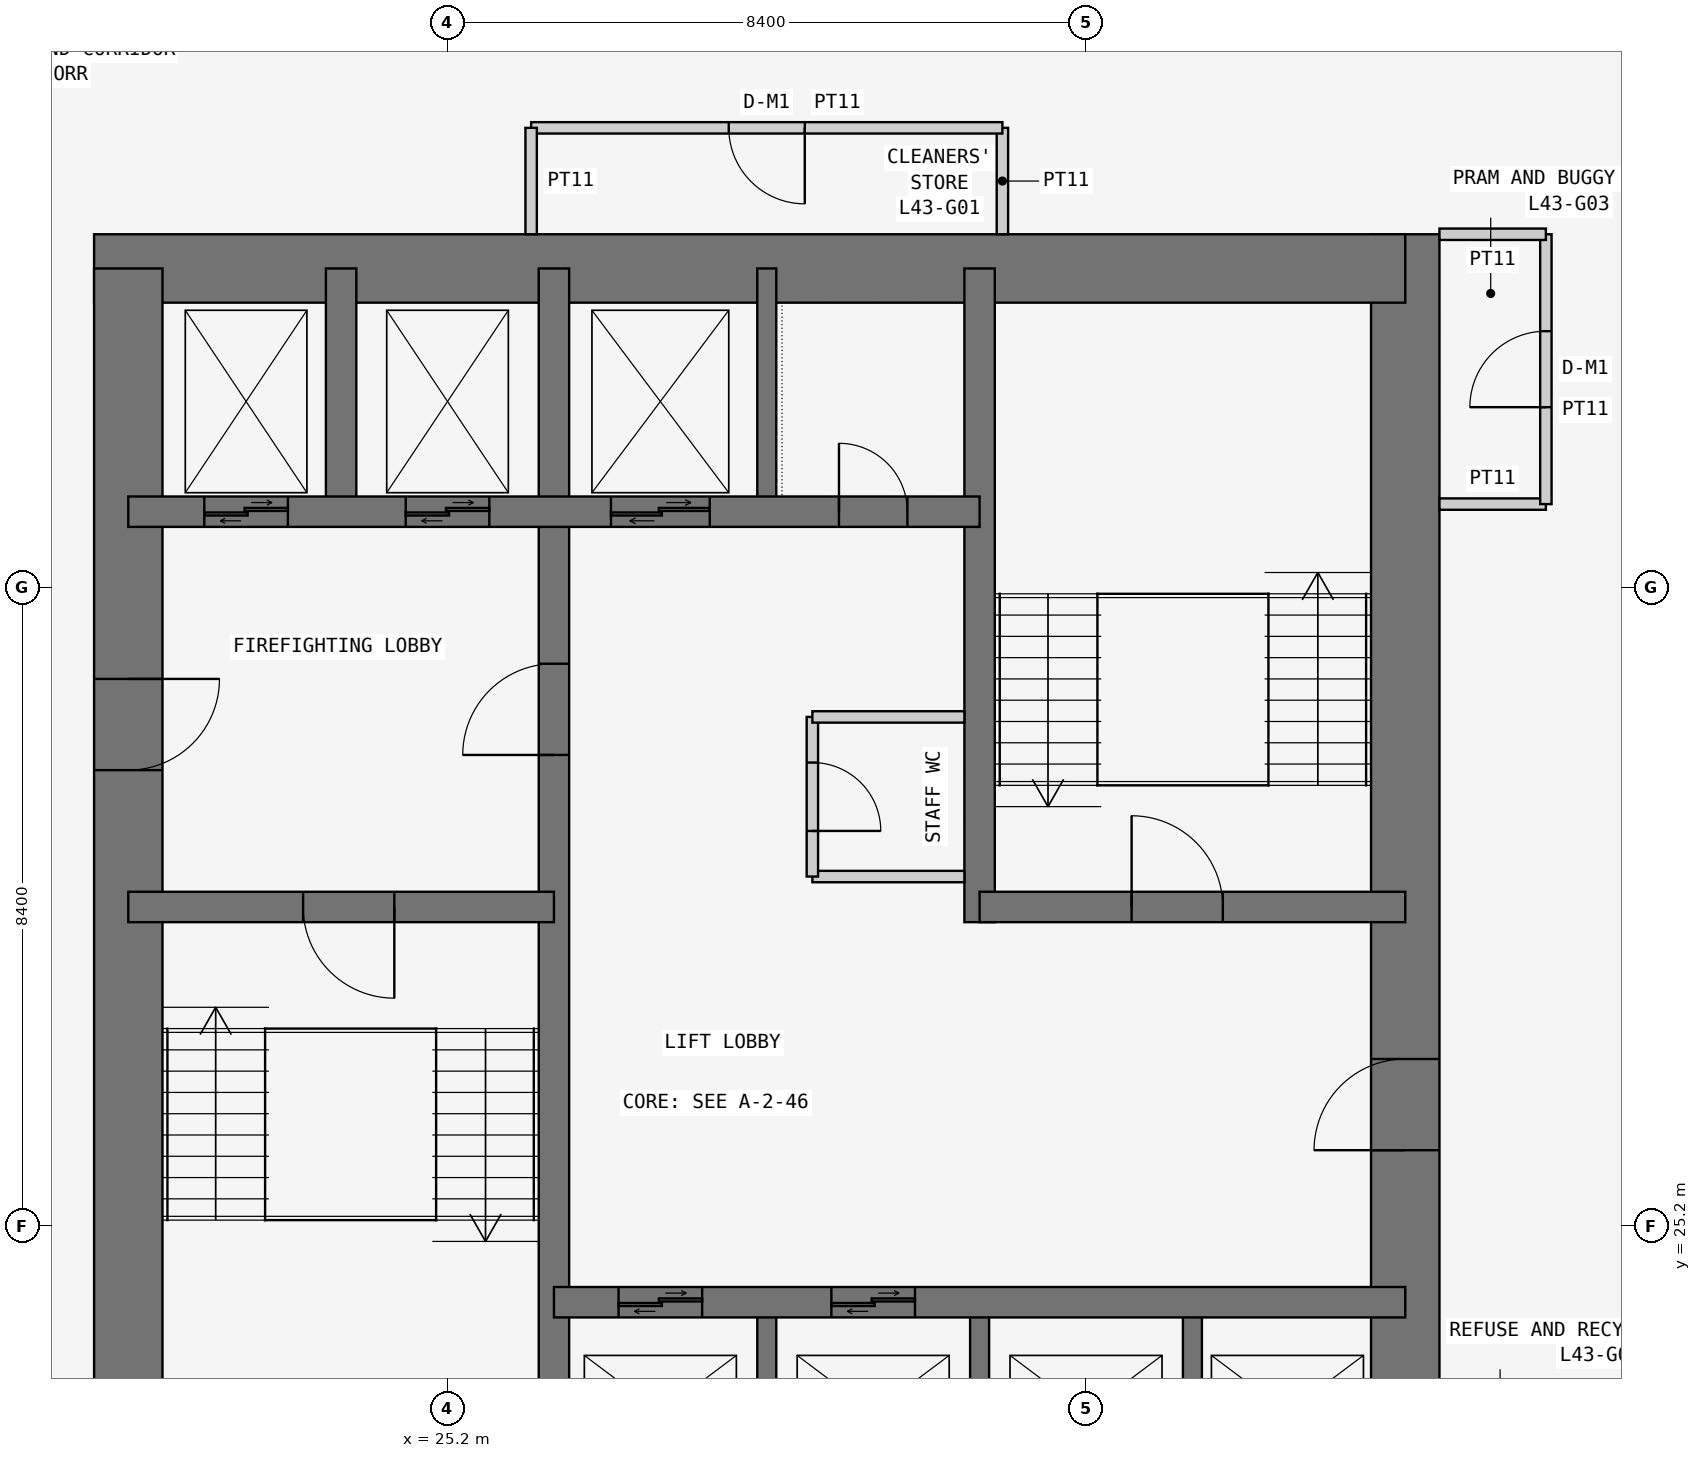
"""IFC4 building model, lengths in metres.
Left out: names, types, materials, properties, quantities, classifications, styles, units other than length and angle.
Written with IfcOpenShell. Run it as: python <this file> out.ifc"""

import sys

from ifc_helpers import new_model, si_unit, direction, frame, frame_2d, origin, place, context, subcontext, project, spatial, rectangle, extrude, element, fill, save


model = new_model("IFC4")
c1 = context("Model", 3, precision=1e-05, world=origin(), true_north=direction((0.0, 1.0)))
c2 = subcontext(c1, "Body", "Model", "MODEL_VIEW")
j1 = project(units=[si_unit("LENGTHUNIT", "METRE"), si_unit("PLANEANGLEUNIT", "RADIAN")], contexts=[c1])
p1 = place(None, origin())
s1 = spatial("IfcSite", under=j1, at=p1, CompositionType="ELEMENT")
p2 = place(p1, origin())
s2 = spatial("IfcBuilding", under=s1, at=p2, CompositionType="ELEMENT")
p3 = place(p2, frame((0.0, 0.0, 166.5)))
s3 = spatial("IfcBuildingStorey", under=s2, at=p3, CompositionType="ELEMENT", Elevation=166.5)
p4 = place(p3, frame((37.8, 21.0, 0.0), z_axis=(0.0, 0.0, 1.0), x_axis=(0.0, 1.0, 0.0)))
e1 = element("IfcWall", 1, at=p4, inside=s3, PredefinedType="SHEAR", context=c2, shape_type="SweptSolid", body=[
    extrude(rectangle(XDim=17.25, YDim=0.9, at=frame_2d((8.625, 0.0))), origin(), (0.0, 0.0, 1.0), 3.6),
])
p5 = place(p4, frame((5.2, 0.0, 0.0)))
e2 = element("IfcOpeningElement", 2, at=p5, cuts=e1, PredefinedType="OPENING", context=c2, shape_type="SweptSolid", body=[
    extrude(rectangle(XDim=1.2, YDim=2.1, at=frame_2d((0.6, 1.05))), frame((0.0, 0.46, 0.0), z_axis=(0.0, -1.0, 0.0), x_axis=(1.0, 0.0, 0.0)), (0.0, 0.0, 1.0), 0.92),
])
p6 = place(p3, frame((37.8, 37.8, 0.0), z_axis=(0.0, 0.0, 1.0), x_axis=(-1.0, 0.0, 0.0)))
e3 = element("IfcWall", 3, at=p6, inside=s3, PredefinedType="SHEAR", context=c2, shape_type="SweptSolid", body=[
    extrude(rectangle(XDim=17.25, YDim=0.9, at=frame_2d((8.625, 0.0))), origin(), (0.0, 0.0, 1.0), 3.6),
])
p7 = place(p3, frame((21.0, 37.8, 0.0), z_axis=(0.0, 0.0, 1.0), x_axis=(0.0, -1.0, 0.0)))
e4 = element("IfcWall", 4, at=p7, inside=s3, PredefinedType="SHEAR", context=c2, shape_type="SweptSolid", body=[
    extrude(rectangle(XDim=17.25, YDim=0.9, at=frame_2d((8.625, 0.0))), origin(), (0.0, 0.0, 1.0), 3.6),
])
p8 = place(p7, frame((5.4, 0.0, 0.0)))
e5 = element("IfcOpeningElement", 5, at=p8, cuts=e4, PredefinedType="OPENING", context=c2, shape_type="SweptSolid", body=[
    extrude(rectangle(XDim=1.2, YDim=2.1, at=frame_2d((0.6, 1.05))), frame((0.0, 0.46, 0.0), z_axis=(0.0, -1.0, 0.0), x_axis=(1.0, 0.0, 0.0)), (0.0, 0.0, 1.0), 0.92),
])
p9 = place(p3, frame((26.6, 21.0, 0.0), z_axis=(0.0, 0.0, 1.0), x_axis=(0.0, 1.0, 0.0)))
e6 = element("IfcWall", 6, at=p9, inside=s3, PredefinedType="SHEAR", context=c2, shape_type="SweptSolid", body=[
    extrude(rectangle(XDim=16.8, YDim=0.4, at=frame_2d((8.4, 0.0))), origin(), (0.0, 0.0, 1.0), 3.6),
])
p10 = place(p9, frame((10.4, 0.0, 0.0)))
e7 = element("IfcOpeningElement", 7, at=p10, cuts=e6, PredefinedType="OPENING", context=c2, shape_type="SweptSolid", body=[
    extrude(rectangle(XDim=1.2, YDim=2.1, at=frame_2d((0.6, 1.05))), frame((0.0, 0.21, 0.0), z_axis=(0.0, -1.0, 0.0), x_axis=(1.0, 0.0, 0.0)), (0.0, 0.0, 1.0), 0.42),
])
p11 = place(p3, frame((21.0, 29.4, 0.0), z_axis=(0.0, 0.0, 1.0), x_axis=(1.0, 0.0, 0.0)))
e8 = element("IfcWall", 8, at=p11, inside=s3, PredefinedType="SHEAR", context=c2, shape_type="SweptSolid", body=[
    extrude(rectangle(XDim=5.6, YDim=0.4, at=frame_2d((2.8, 0.0))), origin(), (0.0, 0.0, 1.0), 3.6),
])
p12 = place(p11, frame((2.3, 0.0, 0.0)))
e9 = element("IfcOpeningElement", 9, at=p12, cuts=e8, PredefinedType="OPENING", context=c2, shape_type="SweptSolid", body=[
    extrude(rectangle(XDim=1.2, YDim=2.1, at=frame_2d((0.6, 1.05))), frame((0.0, 0.21, 0.0), z_axis=(0.0, -1.0, 0.0), x_axis=(1.0, 0.0, 0.0)), (0.0, 0.0, 1.0), 0.42),
])
p13 = place(p3, frame((21.0, 34.6, 0.0), z_axis=(0.0, 0.0, 1.0), x_axis=(1.0, 0.0, 0.0)))
e10 = element("IfcWall", 10, at=p13, inside=s3, PredefinedType="SHEAR", context=c2, shape_type="SweptSolid", body=[
    extrude(rectangle(XDim=11.2, YDim=0.4, at=frame_2d((5.6, 0.0))), origin(), (0.0, 0.0, 1.0), 3.6),
])
p14 = place(p13, frame((9.35, 0.0, 0.0)))
e11 = element("IfcOpeningElement", 11, at=p14, cuts=e10, PredefinedType="OPENING", context=c2, shape_type="SweptSolid", body=[
    extrude(rectangle(XDim=0.9, YDim=2.1, at=frame_2d((0.45, 1.05))), frame((0.0, 0.21, 0.0), z_axis=(0.0, -1.0, 0.0), x_axis=(1.0, 0.0, 0.0)), (0.0, 0.0, 1.0), 0.42),
])
p15 = place(p13, frame((1.0, 0.0, 0.0)))
e12 = element("IfcOpeningElement", 12, at=p15, cuts=e10, PredefinedType="OPENING", context=c2, shape_type="SweptSolid", body=[
    extrude(rectangle(XDim=1.1, YDim=2.1, at=frame_2d((0.55, 1.05))), frame((0.0, 0.21, 0.0), z_axis=(0.0, -1.0, 0.0), x_axis=(1.0, 0.0, 0.0)), (0.0, 0.0, 1.0), 0.42),
])
p16 = place(p13, frame((3.65, 0.0, 0.0)))
e13 = element("IfcOpeningElement", 13, at=p16, cuts=e10, PredefinedType="OPENING", context=c2, shape_type="SweptSolid", body=[
    extrude(rectangle(XDim=1.1, YDim=2.1, at=frame_2d((0.55, 1.05))), frame((0.0, 0.21, 0.0), z_axis=(0.0, -1.0, 0.0), x_axis=(1.0, 0.0, 0.0)), (0.0, 0.0, 1.0), 0.42),
])
p17 = place(p13, frame((6.35, 0.0, 0.0)))
e14 = element("IfcOpeningElement", 14, at=p17, cuts=e10, PredefinedType="OPENING", context=c2, shape_type="SweptSolid", body=[
    extrude(rectangle(XDim=1.3, YDim=2.1, at=frame_2d((0.65, 1.05))), frame((0.0, 0.21, 0.0), z_axis=(0.0, -1.0, 0.0), x_axis=(1.0, 0.0, 0.0)), (0.0, 0.0, 1.0), 0.42),
])
p18 = place(p3, frame((23.8, 34.6, 0.0), z_axis=(0.0, 0.0, 1.0), x_axis=(0.0, 1.0, 0.0)))
e15 = element("IfcWall", 15, at=p18, inside=s3, PredefinedType="SHEAR", context=c2, shape_type="SweptSolid", body=[
    extrude(rectangle(XDim=3.2, YDim=0.4, at=frame_2d((1.6, 0.0))), origin(), (0.0, 0.0, 1.0), 3.6),
])
p19 = place(p3, frame((26.6, 24.2, 0.0), z_axis=(0.0, 0.0, 1.0), x_axis=(1.0, 0.0, 0.0)))
e16 = element("IfcWall", 16, at=p19, inside=s3, PredefinedType="SHEAR", context=c2, shape_type="SweptSolid", body=[
    extrude(rectangle(XDim=11.2, YDim=0.4, at=frame_2d((5.6, 0.0))), origin(), (0.0, 0.0, 1.0), 3.6),
])
p20 = place(p19, frame((0.85, 0.0, 0.0)))
e17 = element("IfcOpeningElement", 17, at=p20, cuts=e16, PredefinedType="OPENING", context=c2, shape_type="SweptSolid", body=[
    extrude(rectangle(XDim=1.1, YDim=2.1, at=frame_2d((0.55, 1.05))), frame((0.0, 0.21, 0.0), z_axis=(0.0, -1.0, 0.0), x_axis=(1.0, 0.0, 0.0)), (0.0, 0.0, 1.0), 0.42),
])
p21 = place(p19, frame((3.65, 0.0, 0.0)))
e18 = element("IfcOpeningElement", 18, at=p21, cuts=e16, PredefinedType="OPENING", context=c2, shape_type="SweptSolid", body=[
    extrude(rectangle(XDim=1.1, YDim=2.1, at=frame_2d((0.55, 1.05))), frame((0.0, 0.21, 0.0), z_axis=(0.0, -1.0, 0.0), x_axis=(1.0, 0.0, 0.0)), (0.0, 0.0, 1.0), 0.42),
])
p22 = place(p3, frame((32.2, 29.2, 0.0), z_axis=(0.0, 0.0, 1.0), x_axis=(0.0, 1.0, 0.0)))
e19 = element("IfcWall", 19, at=p22, inside=s3, PredefinedType="SHEAR", context=c2, shape_type="SweptSolid", body=[
    extrude(rectangle(XDim=8.6, YDim=0.4, at=frame_2d((4.3, 0.0))), origin(), (0.0, 0.0, 1.0), 3.6),
])
p23 = place(p3, frame((32.2, 29.4, 0.0), z_axis=(0.0, 0.0, 1.0), x_axis=(1.0, 0.0, 0.0)))
e20 = element("IfcWall", 20, at=p23, inside=s3, PredefinedType="SHEAR", context=c2, shape_type="SweptSolid", body=[
    extrude(rectangle(XDim=5.6, YDim=0.4, at=frame_2d((2.8, 0.0))), origin(), (0.0, 0.0, 1.0), 3.6),
])
p24 = place(p23, frame((2.0, 0.0, 0.0)))
e21 = element("IfcOpeningElement", 21, at=p24, cuts=e20, PredefinedType="OPENING", context=c2, shape_type="SweptSolid", body=[
    extrude(rectangle(XDim=1.2, YDim=2.1, at=frame_2d((0.6, 1.05))), frame((0.0, 0.21, 0.0), z_axis=(0.0, -1.0, 0.0), x_axis=(1.0, 0.0, 0.0)), (0.0, 0.0, 1.0), 0.42),
])
for number, where, z_axis, x_axis in (
    (22, (29.4, 21.0, 0.0), (0.0, 0.0, 1.0), (0.0, 1.0, 0.0)),
    (23, (32.2, 21.0, 0.0), (0.0, 0.0, 1.0), (0.0, 1.0, 0.0)),
    (24, (35.0, 21.0, 0.0), (0.0, 0.0, 1.0), (0.0, 1.0, 0.0)),
    (25, (29.4, 34.6, 0.0), (0.0, 0.0, 1.0), (0.0, 1.0, 0.0)),
):
    element("IfcWall", number, at=place(p3, frame(where, z_axis=z_axis, x_axis=x_axis)), inside=s3, PredefinedType="SHEAR", context=c2, shape_type="SweptSolid", body=[
        extrude(rectangle(XDim=3.2, YDim=0.25, at=frame_2d((1.6, 0.0))), origin(), (0.0, 0.0, 1.0), 3.6),
    ])
p25 = place(p3, frame((32.5, 38.25, 0.0), z_axis=(0.0, 0.0, 1.0), x_axis=(0.0, 1.0, 0.0)))
e26 = element("IfcWall", 26, at=p25, inside=s3, PredefinedType="PARTITIONING", context=c2, shape_type="SweptSolid", body=[
    extrude(rectangle(XDim=1.4, YDim=0.15, at=frame_2d((0.7, 0.0))), origin(), (0.0, 0.0, 1.0), 3.45),
])
p26 = place(p3, frame((32.5, 39.65, 0.0), z_axis=(0.0, 0.0, 1.0), x_axis=(-1.0, 0.0, 0.0)))
e27 = element("IfcWall", 27, at=p26, inside=s3, PredefinedType="PARTITIONING", context=c2, shape_type="SweptSolid", body=[
    extrude(rectangle(XDim=6.2, YDim=0.15, at=frame_2d((3.1, 0.0))), origin(), (0.0, 0.0, 1.0), 3.45),
])
p27 = place(p26, frame((2.6, 0.0, 0.0)))
e28 = element("IfcOpeningElement", 28, at=p27, cuts=e27, PredefinedType="OPENING", context=c2, shape_type="SweptSolid", body=[
    extrude(rectangle(XDim=1.0, YDim=2.1, at=frame_2d((0.5, 1.05))), frame((0.0, 0.085, 0.0), z_axis=(0.0, -1.0, 0.0), x_axis=(1.0, 0.0, 0.0)), (0.0, 0.0, 1.0), 0.17),
])
for number, where, z_axis, x_axis in (
    (29, (26.3, 39.65, 0.0), (0.0, 0.0, 1.0), (0.0, -1.0, 0.0)),
    (30, (38.25, 34.7, 0.0), (0.0, 0.0, 1.0), (1.0, 0.0, 0.0)),
):
    element("IfcWall", number, at=place(p3, frame(where, z_axis=z_axis, x_axis=x_axis)), inside=s3, PredefinedType="PARTITIONING", context=c2, shape_type="SweptSolid", body=[
        extrude(rectangle(XDim=1.4, YDim=0.15, at=frame_2d((0.7, 0.0))), origin(), (0.0, 0.0, 1.0), 3.45),
    ])
p28 = place(p3, frame((39.65, 34.7, 0.0), z_axis=(0.0, 0.0, 1.0), x_axis=(0.0, 1.0, 0.0)))
e31 = element("IfcWall", 31, at=p28, inside=s3, PredefinedType="PARTITIONING", context=c2, shape_type="SweptSolid", body=[
    extrude(rectangle(XDim=3.55, YDim=0.15, at=frame_2d((1.775, 0.0))), origin(), (0.0, 0.0, 1.0), 3.45),
])
p29 = place(p28, frame((1.275, 0.0, 0.0)))
e32 = element("IfcOpeningElement", 32, at=p29, cuts=e31, PredefinedType="OPENING", context=c2, shape_type="SweptSolid", body=[
    extrude(rectangle(XDim=1.0, YDim=2.1, at=frame_2d((0.5, 1.05))), frame((0.0, 0.085, 0.0), z_axis=(0.0, -1.0, 0.0), x_axis=(1.0, 0.0, 0.0)), (0.0, 0.0, 1.0), 0.17),
])
p30 = place(p3, frame((39.65, 38.25, 0.0), z_axis=(0.0, 0.0, 1.0), x_axis=(-1.0, 0.0, 0.0)))
e33 = element("IfcWall", 33, at=p30, inside=s3, PredefinedType="PARTITIONING", context=c2, shape_type="SweptSolid", body=[
    extrude(rectangle(XDim=1.4, YDim=0.15, at=frame_2d((0.7, 0.0))), origin(), (0.0, 0.0, 1.0), 3.45),
])
p31 = place(p3, frame((32.0, 29.8, 0.0), z_axis=(0.0, 0.0, 1.0), x_axis=(-1.0, 0.0, 0.0)))
e34 = element("IfcWall", 34, at=p31, inside=s3, PredefinedType="PARTITIONING", context=c2, shape_type="SweptSolid", body=[
    extrude(rectangle(XDim=2.0, YDim=0.15, at=frame_2d((1.0, 0.0))), origin(), (0.0, 0.0, 1.0), 3.45),
])
p32 = place(p3, frame((30.0, 29.8, 0.0), z_axis=(0.0, 0.0, 1.0), x_axis=(0.0, 1.0, 0.0)))
e35 = element("IfcWall", 35, at=p32, inside=s3, PredefinedType="PARTITIONING", context=c2, shape_type="SweptSolid", body=[
    extrude(rectangle(XDim=2.1, YDim=0.15, at=frame_2d((1.05, 0.0))), origin(), (0.0, 0.0, 1.0), 3.45),
])
p33 = place(p32, frame((0.6, 0.0, 0.0)))
e36 = element("IfcOpeningElement", 36, at=p33, cuts=e35, PredefinedType="OPENING", context=c2, shape_type="SweptSolid", body=[
    extrude(rectangle(XDim=0.9, YDim=2.1, at=frame_2d((0.45, 1.05))), frame((0.0, 0.085, 0.0), z_axis=(0.0, -1.0, 0.0), x_axis=(1.0, 0.0, 0.0)), (0.0, 0.0, 1.0), 0.17),
])
p34 = place(p3, frame((30.0, 31.9, 0.0), z_axis=(0.0, 0.0, 1.0), x_axis=(1.0, 0.0, 0.0)))
e37 = element("IfcWall", 37, at=p34, inside=s3, PredefinedType="PARTITIONING", context=c2, shape_type="SweptSolid", body=[
    extrude(rectangle(XDim=2.0, YDim=0.15, at=frame_2d((1.0, 0.0))), origin(), (0.0, 0.0, 1.0), 3.45),
])
p35 = place(p27, origin())
e38 = element("IfcDoor", 38, at=p35, inside=s3, OperationType="SINGLE_SWING_LEFT", PredefinedType="DOOR", context=c2, shape_type="SweptSolid", body=[
    extrude(rectangle(XDim=1.0, YDim=2.1, at=frame_2d((0.5, 1.05))), frame((0.0, 0.025, 0.0), z_axis=(0.0, -1.0, 0.0), x_axis=(1.0, 0.0, 0.0)), (0.0, 0.0, 1.0), 0.05),
])
fill(e28, e38)
p36 = place(p29, origin())
e39 = element("IfcDoor", 39, at=p36, inside=s3, OperationType="SINGLE_SWING_LEFT", PredefinedType="DOOR", context=c2, shape_type="SweptSolid", body=[
    extrude(rectangle(XDim=1.0, YDim=2.1, at=frame_2d((0.5, 1.05))), frame((0.0, 0.025, 0.0), z_axis=(0.0, -1.0, 0.0), x_axis=(1.0, 0.0, 0.0)), (0.0, 0.0, 1.0), 0.05),
])
fill(e32, e39)
p37 = place(p8, origin())
e40 = element("IfcDoor", 40, at=p37, inside=s3, OperationType="SINGLE_SWING_LEFT", PredefinedType="DOOR", context=c2, shape_type="SweptSolid", body=[
    extrude(rectangle(XDim=1.2, YDim=2.1, at=frame_2d((0.6, 1.05))), frame((0.0, 0.025, 0.0), z_axis=(0.0, -1.0, 0.0), x_axis=(1.0, 0.0, 0.0)), (0.0, 0.0, 1.0), 0.05),
])
fill(e5, e40)
p38 = place(p12, frame((1.2, 0.0, 0.0), z_axis=(0.0, 0.0, 1.0), x_axis=(-1.0, 0.0, 0.0)))
e41 = element("IfcDoor", 41, at=p38, inside=s3, OperationType="SINGLE_SWING_LEFT", PredefinedType="DOOR", context=c2, shape_type="SweptSolid", body=[
    extrude(rectangle(XDim=1.2, YDim=2.1, at=frame_2d((0.6, 1.05))), frame((0.0, 0.025, 0.0), z_axis=(0.0, -1.0, 0.0), x_axis=(1.0, 0.0, 0.0)), (0.0, 0.0, 1.0), 0.05),
])
fill(e9, e41)
p39 = place(p10, origin())
e42 = element("IfcDoor", 42, at=p39, inside=s3, OperationType="SINGLE_SWING_LEFT", PredefinedType="DOOR", context=c2, shape_type="SweptSolid", body=[
    extrude(rectangle(XDim=1.2, YDim=2.1, at=frame_2d((0.6, 1.05))), frame((0.0, 0.025, 0.0), z_axis=(0.0, -1.0, 0.0), x_axis=(1.0, 0.0, 0.0)), (0.0, 0.0, 1.0), 0.05),
])
fill(e7, e42)
p40 = place(p5, origin())
e43 = element("IfcDoor", 43, at=p40, inside=s3, OperationType="SINGLE_SWING_LEFT", PredefinedType="DOOR", context=c2, shape_type="SweptSolid", body=[
    extrude(rectangle(XDim=1.2, YDim=2.1, at=frame_2d((0.6, 1.05))), frame((0.0, 0.025, 0.0), z_axis=(0.0, -1.0, 0.0), x_axis=(1.0, 0.0, 0.0)), (0.0, 0.0, 1.0), 0.05),
])
fill(e2, e43)
p41 = place(p24, origin())
e44 = element("IfcDoor", 44, at=p41, inside=s3, OperationType="SINGLE_SWING_LEFT", PredefinedType="DOOR", context=c2, shape_type="SweptSolid", body=[
    extrude(rectangle(XDim=1.2, YDim=2.1, at=frame_2d((0.6, 1.05))), frame((0.0, 0.025, 0.0), z_axis=(0.0, -1.0, 0.0), x_axis=(1.0, 0.0, 0.0)), (0.0, 0.0, 1.0), 0.05),
])
fill(e21, e44)
p42 = place(p14, origin())
e45 = element("IfcDoor", 45, at=p42, inside=s3, OperationType="SINGLE_SWING_LEFT", PredefinedType="DOOR", context=c2, shape_type="SweptSolid", body=[
    extrude(rectangle(XDim=0.9, YDim=2.1, at=frame_2d((0.45, 1.05))), frame((0.0, 0.025, 0.0), z_axis=(0.0, -1.0, 0.0), x_axis=(1.0, 0.0, 0.0)), (0.0, 0.0, 1.0), 0.05),
])
fill(e11, e45)
p43 = place(p33, frame((0.9, 0.0, 0.0), z_axis=(0.0, 0.0, 1.0), x_axis=(-1.0, 0.0, 0.0)))
e46 = element("IfcDoor", 46, at=p43, inside=s3, OperationType="SINGLE_SWING_RIGHT", PredefinedType="DOOR", context=c2, shape_type="SweptSolid", body=[
    extrude(rectangle(XDim=0.9, YDim=2.1, at=frame_2d((0.45, 1.05))), frame((0.0, 0.025, 0.0), z_axis=(0.0, -1.0, 0.0), x_axis=(1.0, 0.0, 0.0)), (0.0, 0.0, 1.0), 0.05),
])
fill(e36, e46)
p44 = place(p20, origin())
e47 = element("IfcDoor", 47, at=p44, inside=s3, OperationType="DOUBLE_DOOR_SLIDING", PredefinedType="DOOR", context=c2, shape_type="SweptSolid", body=[
    extrude(rectangle(XDim=1.1, YDim=2.1, at=frame_2d((0.55, 1.05))), frame((0.0, 0.025, 0.0), z_axis=(0.0, -1.0, 0.0), x_axis=(1.0, 0.0, 0.0)), (0.0, 0.0, 1.0), 0.05),
])
fill(e17, e47)
p45 = place(p21, origin())
e48 = element("IfcDoor", 48, at=p45, inside=s3, OperationType="DOUBLE_DOOR_SLIDING", PredefinedType="DOOR", context=c2, shape_type="SweptSolid", body=[
    extrude(rectangle(XDim=1.1, YDim=2.1, at=frame_2d((0.55, 1.05))), frame((0.0, 0.025, 0.0), z_axis=(0.0, -1.0, 0.0), x_axis=(1.0, 0.0, 0.0)), (0.0, 0.0, 1.0), 0.05),
])
fill(e18, e48)
p46 = place(p15, origin())
e49 = element("IfcDoor", 49, at=p46, inside=s3, OperationType="DOUBLE_DOOR_SLIDING", PredefinedType="DOOR", context=c2, shape_type="SweptSolid", body=[
    extrude(rectangle(XDim=1.1, YDim=2.1, at=frame_2d((0.55, 1.05))), frame((0.0, 0.025, 0.0), z_axis=(0.0, -1.0, 0.0), x_axis=(1.0, 0.0, 0.0)), (0.0, 0.0, 1.0), 0.05),
])
fill(e12, e49)
p47 = place(p16, origin())
e50 = element("IfcDoor", 50, at=p47, inside=s3, OperationType="DOUBLE_DOOR_SLIDING", PredefinedType="DOOR", context=c2, shape_type="SweptSolid", body=[
    extrude(rectangle(XDim=1.1, YDim=2.1, at=frame_2d((0.55, 1.05))), frame((0.0, 0.025, 0.0), z_axis=(0.0, -1.0, 0.0), x_axis=(1.0, 0.0, 0.0)), (0.0, 0.0, 1.0), 0.05),
])
fill(e13, e50)
p48 = place(p17, origin())
e51 = element("IfcDoor", 51, at=p48, inside=s3, OperationType="DOUBLE_DOOR_SLIDING", PredefinedType="DOOR", context=c2, shape_type="SweptSolid", body=[
    extrude(rectangle(XDim=1.3, YDim=2.1, at=frame_2d((0.65, 1.05))), frame((0.0, 0.025, 0.0), z_axis=(0.0, -1.0, 0.0), x_axis=(1.0, 0.0, 0.0)), (0.0, 0.0, 1.0), 0.05),
])
fill(e14, e51)
save(model, sys.argv[1])
